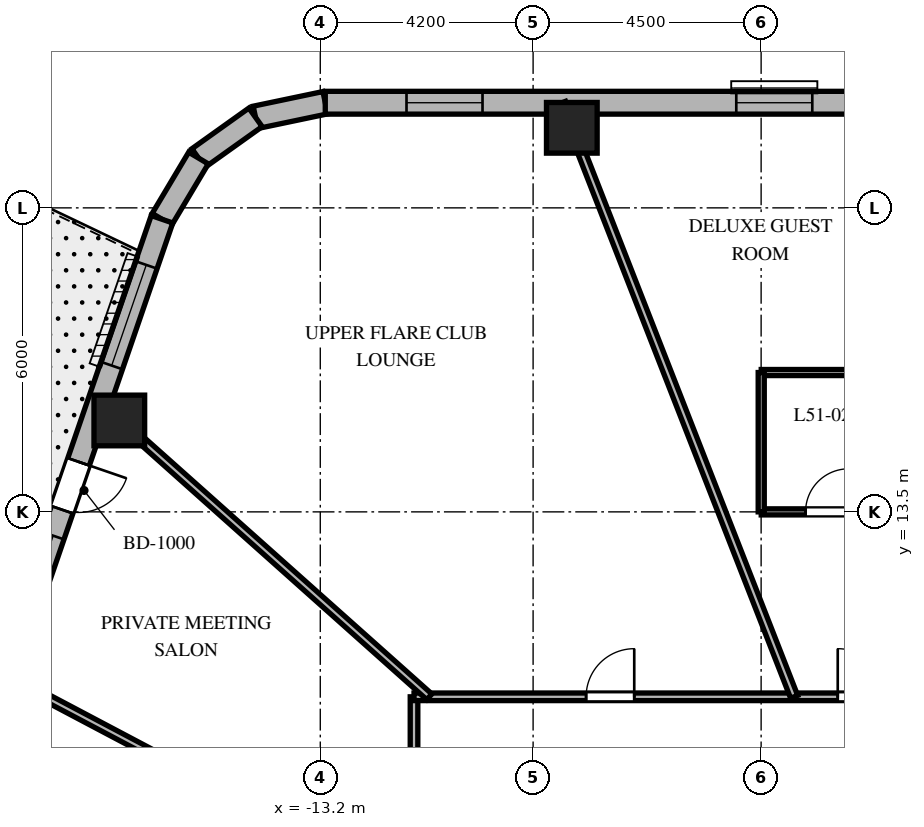
"""IFC4 building model, lengths in metres.
Left out: names, types, materials, properties, quantities, classifications, styles, units other than length and angle.
Written with IfcOpenShell. Run it as: python <this file> out.ifc"""

import sys

from ifc_helpers import new_model, si_unit, direction, frame, frame_2d, origin, origin_2d, place, context, subcontext, project, spatial, rectangle, extrude, element, fill, save


model = new_model("IFC4")
c1 = context("Model", 3, precision=1e-05, world=origin(), true_north=direction((0.0, 1.0)))
c2 = subcontext(c1, "Body", "Model", "MODEL_VIEW")
j1 = project(units=[si_unit("LENGTHUNIT", "METRE"), si_unit("PLANEANGLEUNIT", "RADIAN")], contexts=[c1])
p1 = place(None, origin())
s1 = spatial("IfcSite", under=j1, at=p1, CompositionType="ELEMENT")
p2 = place(p1, origin())
s2 = spatial("IfcBuilding", under=s1, at=p2, CompositionType="ELEMENT")
p3 = place(p2, frame((0.0, 0.0, 206.5)))
s3 = spatial("IfcBuildingStorey", under=s2, at=p3, CompositionType="ELEMENT", Elevation=206.5)
for number, where, z_axis, x_axis in (
    (1, (-8.236, 21.08, 0.0), (0.0, 0.0, 1.0), (1.0, 0.0, 0.0)),
    (2, (-17.166, 15.304, 0.0), (0.0, 0.0, 1.0), (1.0, 0.0, 0.0)),
):
    element("IfcColumn", number, at=place(p3, frame(where, z_axis=z_axis, x_axis=x_axis)), inside=s3, PredefinedType="COLUMN", context=c2, shape_type="SweptSolid", body=[
        extrude(rectangle(XDim=1.0, YDim=1.0, at=origin_2d()), origin(), (0.0, 0.0, 1.0), 3.8),
    ])
p4 = place(p3, frame((-13.102, 21.575, 0.0), z_axis=(0.0, 0.0, 1.0), x_axis=(-0.978757421505, -0.205021730188, 0.0)))
e3 = element("IfcWall", 3, at=p4, inside=s3, PredefinedType="SOLIDWALL", context=c2, shape_type="SweptSolid", body=[
    extrude(rectangle(XDim=1.406, YDim=0.45, at=frame_2d((0.703, 0.0))), origin(), (0.0, 0.0, 1.0), 3.5),
])
p5 = place(p3, frame((-14.478, 21.287, 0.0), z_axis=(0.0, 0.0, 1.0), x_axis=(-0.813888518617, -0.58102106611, 0.0)))
e4 = element("IfcWall", 4, at=p5, inside=s3, PredefinedType="SOLIDWALL", context=c2, shape_type="SweptSolid", body=[
    extrude(rectangle(XDim=1.383, YDim=0.45, at=frame_2d((0.691, 0.0))), origin(), (0.0, 0.0, 1.0), 3.5),
])
p6 = place(p3, frame((-15.604, 20.483, 0.0), z_axis=(0.0, 0.0, 1.0), x_axis=(-0.512222149036, -0.858852996756, 0.0)))
e5 = element("IfcWall", 5, at=p6, inside=s3, PredefinedType="SOLIDWALL", context=c2, shape_type="SweptSolid", body=[
    extrude(rectangle(XDim=1.406, YDim=0.45, at=frame_2d((0.703, 0.0))), origin(), (0.0, 0.0, 1.0), 3.5),
])
p7 = place(p3, frame((11.298, 21.575, 0.0), z_axis=(0.0, 0.0, 1.0), x_axis=(-1.0, 0.0, 0.0)))
e6 = element("IfcWall", 6, at=p7, inside=s3, PredefinedType="SOLIDWALL", context=c2, shape_type="SweptSolid", body=[
    extrude(rectangle(XDim=24.399, YDim=0.45, at=frame_2d((12.2, 0.0))), origin(), (0.0, 0.0, 1.0), 3.5),
])
p8 = place(p7, frame((1.604, 0.0, 0.8)))
e7 = element("IfcOpeningElement", 7, at=p8, cuts=e6, PredefinedType="OPENING", context=c2, shape_type="SweptSolid", body=[
    extrude(rectangle(XDim=1.5, YDim=1.8, at=frame_2d((0.75, 0.9))), frame((0.0, 0.235, 0.0), z_axis=(0.0, -1.0, 0.0), x_axis=(1.0, 0.0, 0.0)), (0.0, 0.0, 1.0), 0.47),
])
p9 = place(p7, frame((8.035, 0.0, 0.8)))
e8 = element("IfcOpeningElement", 8, at=p9, cuts=e6, PredefinedType="OPENING", context=c2, shape_type="SweptSolid", body=[
    extrude(rectangle(XDim=1.5, YDim=1.8, at=frame_2d((0.75, 0.9))), frame((0.0, 0.235, 0.0), z_axis=(0.0, -1.0, 0.0), x_axis=(1.0, 0.0, 0.0)), (0.0, 0.0, 1.0), 0.47),
])
p10 = place(p7, frame((14.788, 0.0, 0.8)))
e9 = element("IfcOpeningElement", 9, at=p10, cuts=e6, PredefinedType="OPENING", context=c2, shape_type="SweptSolid", body=[
    extrude(rectangle(XDim=1.5, YDim=1.8, at=frame_2d((0.75, 0.9))), frame((0.0, 0.235, 0.0), z_axis=(0.0, -1.0, 0.0), x_axis=(1.0, 0.0, 0.0)), (0.0, 0.0, 1.0), 0.47),
])
p11 = place(p7, frame((21.296, 0.0, 0.8)))
e10 = element("IfcOpeningElement", 10, at=p11, cuts=e6, PredefinedType="OPENING", context=c2, shape_type="SweptSolid", body=[
    extrude(rectangle(XDim=1.5, YDim=1.8, at=frame_2d((0.75, 0.9))), frame((0.0, 0.235, 0.0), z_axis=(0.0, -1.0, 0.0), x_axis=(1.0, 0.0, 0.0)), (0.0, 0.0, 1.0), 0.47),
])
p12 = place(p3, frame((-16.324, 19.275, 0.0), z_axis=(0.0, 0.0, 1.0), x_axis=(-0.325083142304, -0.945685439557, 0.0)))
e11 = element("IfcWall", 11, at=p12, inside=s3, PredefinedType="SOLIDWALL", context=c2, shape_type="SweptSolid", body=[
    extrude(rectangle(XDim=20.224, YDim=0.45, at=frame_2d((10.112, 0.0))), origin(), (0.0, 0.0, 1.0), 3.5),
])
p13 = place(p12, frame((5.062, 0.0, 0.0)))
e12 = element("IfcOpeningElement", 12, at=p13, cuts=e11, PredefinedType="OPENING", context=c2, shape_type="SweptSolid", body=[
    extrude(rectangle(XDim=1.0, YDim=2.15, at=frame_2d((0.5, 1.075))), frame((0.0, 0.235, 0.0), z_axis=(0.0, -1.0, 0.0), x_axis=(1.0, 0.0, 0.0)), (0.0, 0.0, 1.0), 0.47),
])
p14 = place(p12, frame((0.953, 0.0, 0.8)))
e13 = element("IfcOpeningElement", 13, at=p14, cuts=e11, PredefinedType="OPENING", context=c2, shape_type="SweptSolid", body=[
    extrude(rectangle(XDim=2.1, YDim=1.85, at=frame_2d((1.05, 0.925))), frame((0.0, 0.235, 0.0), z_axis=(0.0, -1.0, 0.0), x_axis=(1.0, 0.0, 0.0)), (0.0, 0.0, 1.0), 0.47),
])
p15 = place(p12, frame((6.604, 0.0, 0.8)))
e14 = element("IfcOpeningElement", 14, at=p15, cuts=e11, PredefinedType="OPENING", context=c2, shape_type="SweptSolid", body=[
    extrude(rectangle(XDim=2.1, YDim=1.85, at=frame_2d((1.05, 0.925))), frame((0.0, 0.235, 0.0), z_axis=(0.0, -1.0, 0.0), x_axis=(1.0, 0.0, 0.0)), (0.0, 0.0, 1.0), 0.47),
])
p16 = place(p12, frame((11.585, 0.0, 0.8)))
e15 = element("IfcOpeningElement", 15, at=p16, cuts=e11, PredefinedType="OPENING", context=c2, shape_type="SweptSolid", body=[
    extrude(rectangle(XDim=2.1, YDim=1.85, at=frame_2d((1.05, 0.925))), frame((0.0, 0.235, 0.0), z_axis=(0.0, -1.0, 0.0), x_axis=(1.0, 0.0, 0.0)), (0.0, 0.0, 1.0), 0.47),
])
p17 = place(p12, frame((17.118, 0.0, 0.8)))
e16 = element("IfcOpeningElement", 16, at=p17, cuts=e11, PredefinedType="OPENING", context=c2, shape_type="SweptSolid", body=[
    extrude(rectangle(XDim=2.1, YDim=1.85, at=frame_2d((1.05, 0.925))), frame((0.0, 0.235, 0.0), z_axis=(0.0, -1.0, 0.0), x_axis=(1.0, 0.0, 0.0)), (0.0, 0.0, 1.0), 0.47),
])
p18 = place(p3, frame((-11.35, 4.4, 0.0), z_axis=(0.0, 0.0, 1.0), x_axis=(0.0, 1.0, 0.0)))
e17 = element("IfcWall", 17, at=p18, inside=s3, PredefinedType="PARTITIONING", context=c2, shape_type="SweptSolid", body=[
    extrude(rectangle(XDim=5.45, YDim=0.15, at=frame_2d((2.725, 0.0))), origin(), (0.0, 0.0, 1.0), 2.99),
])
p19 = place(p18, frame((2.955, 0.0, 0.0)))
e18 = element("IfcOpeningElement", 18, at=p19, cuts=e17, PredefinedType="OPENING", context=c2, shape_type="SweptSolid", body=[
    extrude(rectangle(XDim=0.9, YDim=2.03, at=frame_2d((0.45, 1.015))), frame((0.0, 0.085, 0.0), z_axis=(0.0, -1.0, 0.0), x_axis=(1.0, 0.0, 0.0)), (0.0, 0.0, 1.0), 0.17),
])
p20 = place(p3, frame((-11.35, 9.85, 0.0), z_axis=(0.0, 0.0, 1.0), x_axis=(1.0, 0.0, 0.0)))
e19 = element("IfcWall", 19, at=p20, inside=s3, PredefinedType="PARTITIONING", context=c2, shape_type="SweptSolid", body=[
    extrude(rectangle(XDim=10.43, YDim=0.15, at=frame_2d((5.215, 0.0))), origin(), (0.0, 0.0, 1.0), 2.99),
])
p21 = place(p20, frame((8.362, 0.0, 0.0)))
e20 = element("IfcOpeningElement", 20, at=p21, cuts=e19, PredefinedType="OPENING", context=c2, shape_type="SweptSolid", body=[
    extrude(rectangle(XDim=0.95, YDim=2.03, at=frame_2d((0.475, 1.015))), frame((0.0, 0.085, 0.0), z_axis=(0.0, -1.0, 0.0), x_axis=(1.0, 0.0, 0.0)), (0.0, 0.0, 1.0), 0.17),
])
p22 = place(p20, frame((3.396, 0.0, 0.0)))
e21 = element("IfcOpeningElement", 21, at=p22, cuts=e19, PredefinedType="OPENING", context=c2, shape_type="SweptSolid", body=[
    extrude(rectangle(XDim=0.95, YDim=2.03, at=frame_2d((0.475, 1.015))), frame((0.0, 0.085, 0.0), z_axis=(0.0, -1.0, 0.0), x_axis=(1.0, 0.0, 0.0)), (0.0, 0.0, 1.0), 0.17),
])
p23 = place(p3, frame((-3.848, 9.85, 0.0), z_axis=(0.0, 0.0, 1.0), x_axis=(-0.363921778212, 0.931429513889, 0.0)))
e22 = element("IfcWall", 22, at=p23, inside=s3, PredefinedType="PARTITIONING", context=c2, shape_type="SweptSolid", body=[
    extrude(rectangle(XDim=12.588, YDim=0.15, at=frame_2d((6.294, 0.0))), origin(), (0.0, 0.0, 1.0), 2.74),
])
p24 = place(p3, frame((-11.048, 9.85, 0.0), z_axis=(0.0, 0.0, 1.0), x_axis=(-0.746444434655, 0.665447748492, 0.0)))
e23 = element("IfcWall", 23, at=p24, inside=s3, PredefinedType="PARTITIONING", context=c2, shape_type="SweptSolid", body=[
    extrude(rectangle(XDim=8.732, YDim=0.15, at=frame_2d((4.366, 0.0))), origin(), (0.0, 0.0, 1.0), 2.74),
])
p25 = place(p3, frame((-11.35, 5.999, 0.0), z_axis=(0.0, 0.0, 1.0), x_axis=(-0.884112301724, 0.467274478161, 0.0)))
e24 = element("IfcWall", 24, at=p25, inside=s3, PredefinedType="PARTITIONING", context=c2, shape_type="SweptSolid", body=[
    extrude(rectangle(XDim=9.129, YDim=0.15, at=frame_2d((4.564, 0.0))), origin(), (0.0, 0.0, 1.0), 2.74),
])
p26 = place(p3, frame((-4.498, 13.5, 0.0), z_axis=(0.0, 0.0, 1.0), x_axis=(1.0, 0.0, 0.0)))
e25 = element("IfcWall", 25, at=p26, inside=s3, PredefinedType="PARTITIONING", context=c2, shape_type="SweptSolid", body=[
    extrude(rectangle(XDim=2.6, YDim=0.12, at=frame_2d((1.3, 0.0))), origin(), (0.0, 0.0, 1.0), 3.027),
])
p27 = place(p26, frame((0.875, 0.0, 0.0)))
e26 = element("IfcOpeningElement", 26, at=p27, cuts=e25, PredefinedType="OPENING", context=c2, shape_type="SweptSolid", body=[
    extrude(rectangle(XDim=0.85, YDim=2.03, at=frame_2d((0.425, 1.015))), frame((0.0, 0.07, 0.0), z_axis=(0.0, -1.0, 0.0), x_axis=(1.0, 0.0, 0.0)), (0.0, 0.0, 1.0), 0.14),
])
p28 = place(p3, frame((-1.898, 16.25, 0.0), z_axis=(0.0, 0.0, 1.0), x_axis=(-1.0, 0.0, 0.0)))
e27 = element("IfcWall", 27, at=p28, inside=s3, PredefinedType="PARTITIONING", context=c2, shape_type="SweptSolid", body=[
    extrude(rectangle(XDim=2.6, YDim=0.12, at=frame_2d((1.3, 0.0))), origin(), (0.0, 0.0, 1.0), 3.5),
])
p29 = place(p3, frame((-4.498, 16.25, 0.0), z_axis=(0.0, 0.0, 1.0), x_axis=(0.0, -1.0, 0.0)))
e28 = element("IfcWall", 28, at=p29, inside=s3, PredefinedType="PARTITIONING", context=c2, shape_type="SweptSolid", body=[
    extrude(rectangle(XDim=2.75, YDim=0.12, at=frame_2d((1.375, 0.0))), origin(), (0.0, 0.0, 1.0), 3.027),
])
p30 = place(p10, origin())
e29 = element("IfcWindow", 29, at=p30, inside=s3, PartitioningType="SINGLE_PANEL", PredefinedType="WINDOW", context=c2, shape_type="SweptSolid", body=[
    extrude(rectangle(XDim=1.5, YDim=1.8, at=frame_2d((0.75, 0.9))), frame((0.0, 0.03, 0.0), z_axis=(0.0, -1.0, 0.0), x_axis=(1.0, 0.0, 0.0)), (0.0, 0.0, 1.0), 0.06),
])
fill(e9, e29)
p31 = place(p11, origin())
e30 = element("IfcWindow", 30, at=p31, inside=s3, PartitioningType="SINGLE_PANEL", PredefinedType="WINDOW", context=c2, shape_type="SweptSolid", body=[
    extrude(rectangle(XDim=1.5, YDim=1.8, at=frame_2d((0.75, 0.9))), frame((0.0, 0.03, 0.0), z_axis=(0.0, -1.0, 0.0), x_axis=(1.0, 0.0, 0.0)), (0.0, 0.0, 1.0), 0.06),
])
fill(e10, e30)
p32 = place(p13, origin())
e31 = element("IfcDoor", 31, at=p32, inside=s3, OperationType="SINGLE_SWING_LEFT", PredefinedType="DOOR", context=c2, shape_type="SweptSolid", body=[
    extrude(rectangle(XDim=1.0, YDim=2.15, at=frame_2d((0.5, 1.075))), frame((0.0, 0.025, 0.0), z_axis=(0.0, -1.0, 0.0), x_axis=(1.0, 0.0, 0.0)), (0.0, 0.0, 1.0), 0.05),
])
fill(e12, e31)
p33 = place(p14, origin())
e32 = element("IfcWindow", 32, at=p33, inside=s3, PartitioningType="SINGLE_PANEL", PredefinedType="WINDOW", context=c2, shape_type="SweptSolid", body=[
    extrude(rectangle(XDim=2.1, YDim=1.85, at=frame_2d((1.05, 0.925))), frame((0.0, 0.03, 0.0), z_axis=(0.0, -1.0, 0.0), x_axis=(1.0, 0.0, 0.0)), (0.0, 0.0, 1.0), 0.06),
])
fill(e13, e32)
p34 = place(p15, origin())
e33 = element("IfcWindow", 33, at=p34, inside=s3, PartitioningType="SINGLE_PANEL", PredefinedType="WINDOW", context=c2, shape_type="SweptSolid", body=[
    extrude(rectangle(XDim=2.1, YDim=1.85, at=frame_2d((1.05, 0.925))), frame((0.0, 0.03, 0.0), z_axis=(0.0, -1.0, 0.0), x_axis=(1.0, 0.0, 0.0)), (0.0, 0.0, 1.0), 0.06),
])
fill(e14, e33)
p35 = place(p21, origin())
e34 = element("IfcDoor", 34, at=p35, inside=s3, OperationType="SINGLE_SWING_LEFT", PredefinedType="DOOR", context=c2, shape_type="SweptSolid", body=[
    extrude(rectangle(XDim=0.95, YDim=2.03, at=frame_2d((0.475, 1.015))), frame((0.0, 0.025, 0.0), z_axis=(0.0, -1.0, 0.0), x_axis=(1.0, 0.0, 0.0)), (0.0, 0.0, 1.0), 0.05),
])
fill(e20, e34)
p36 = place(p27, origin())
e35 = element("IfcDoor", 35, at=p36, inside=s3, OperationType="SINGLE_SWING_RIGHT", PredefinedType="DOOR", context=c2, shape_type="SweptSolid", body=[
    extrude(rectangle(XDim=0.85, YDim=2.03, at=frame_2d((0.425, 1.015))), frame((0.0, 0.025, 0.0), z_axis=(0.0, -1.0, 0.0), x_axis=(1.0, 0.0, 0.0)), (0.0, 0.0, 1.0), 0.05),
])
fill(e26, e35)
p37 = place(p22, origin())
e36 = element("IfcDoor", 36, at=p37, inside=s3, OperationType="SINGLE_SWING_RIGHT", PredefinedType="DOOR", context=c2, shape_type="SweptSolid", body=[
    extrude(rectangle(XDim=0.95, YDim=2.03, at=frame_2d((0.475, 1.015))), frame((0.0, 0.025, 0.0), z_axis=(0.0, -1.0, 0.0), x_axis=(1.0, 0.0, 0.0)), (0.0, 0.0, 1.0), 0.05),
])
fill(e21, e36)
save(model, sys.argv[1])
